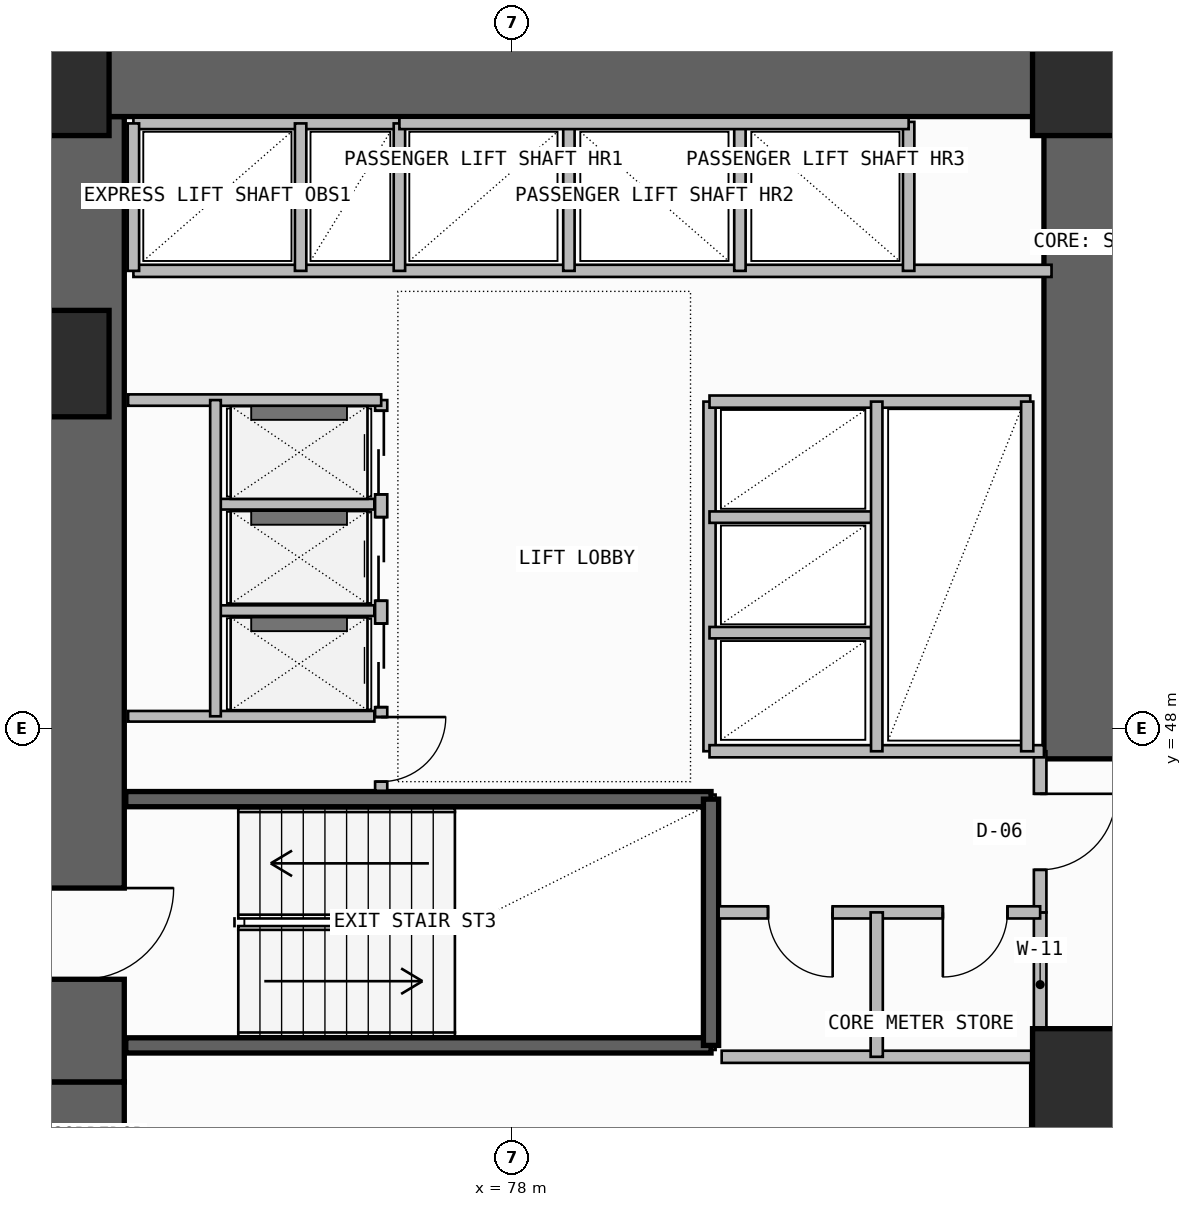
"""IFC4 building model, lengths in metres.
Left out: names, types, materials, properties, quantities, classifications, styles, units other than length and angle.
Written with IfcOpenShell. Run it as: python <this file> out.ifc"""

import sys

from ifc_helpers import new_model, si_unit, direction, frame, frame_2d, origin, origin_2d, place, context, subcontext, project, spatial, rectangle, extrude, element, fill, save


model = new_model("IFC4")
c1 = context("Model", 3, precision=1e-05, world=origin(), true_north=direction((0.0, 1.0)))
c2 = subcontext(c1, "Body", "Model", "MODEL_VIEW")
j1 = project(units=[si_unit("LENGTHUNIT", "METRE"), si_unit("PLANEANGLEUNIT", "RADIAN")], contexts=[c1])
p1 = place(None, origin())
s1 = spatial("IfcSite", under=j1, at=p1, CompositionType="ELEMENT")
p2 = place(p1, origin())
s2 = spatial("IfcBuilding", under=s1, at=p2, CompositionType="ELEMENT")
p3 = place(p2, frame((0.0, 0.0, 88.5)))
s3 = spatial("IfcBuildingStorey", under=s2, at=p3, CompositionType="ELEMENT", Elevation=88.5)
p4 = place(p3, frame((72.35, 35.5, -0.26), z_axis=(0.0, 0.0, 1.0), x_axis=(0.0, 1.0, 0.0)))
e1 = element("IfcWall", 1, at=p4, inside=s3, PredefinedType="SHEAR", context=c2, shape_type="SweptSolid", body=[
    extrude(rectangle(XDim=7.85, YDim=1.1, at=frame_2d((3.925, 0.0))), origin(), (0.0, 0.0, 1.0), 3.6),
])
p5 = place(p4, frame((1.45, 0.0, 0.26)))
e2 = element("IfcOpeningElement", 2, at=p5, cuts=e1, PredefinedType="OPENING", context=c2, shape_type="SweptSolid", body=[
    extrude(rectangle(XDim=1.2, YDim=2.2, at=frame_2d((0.6, 1.1))), frame((0.0, 0.56, 0.0), z_axis=(0.0, -1.0, 0.0), x_axis=(1.0, 0.0, 0.0)), (0.0, 0.0, 1.0), 1.12),
])
p6 = place(p3, frame((72.35, 43.35, -0.26), z_axis=(0.0, 0.0, 1.0), x_axis=(0.0, 1.0, 0.0)))
e3 = element("IfcWall", 3, at=p6, inside=s3, PredefinedType="SHEAR", context=c2, shape_type="SweptSolid", body=[
    extrude(rectangle(XDim=12.7, YDim=1.1, at=frame_2d((6.35, 0.0))), origin(), (0.0, 0.0, 1.0), 3.6),
])
p7 = place(p6, frame((1.35, 0.0, 0.26)))
e4 = element("IfcOpeningElement", 4, at=p7, cuts=e3, PredefinedType="OPENING", context=c2, shape_type="SweptSolid", body=[
    extrude(rectangle(XDim=1.2, YDim=2.2, at=frame_2d((0.6, 1.1))), frame((0.0, 0.56, 0.0), z_axis=(0.0, -1.0, 0.0), x_axis=(1.0, 0.0, 0.0)), (0.0, 0.0, 1.0), 1.12),
])
p8 = place(p3, frame((71.8, 56.6, -0.26), z_axis=(0.0, 0.0, 1.0), x_axis=(1.0, 0.0, 0.0)))
e5 = element("IfcWall", 5, at=p8, inside=s3, PredefinedType="SHEAR", context=c2, shape_type="SweptSolid", body=[
    extrude(rectangle(XDim=14.3, YDim=1.1, at=frame_2d((7.15, 0.0))), origin(), (0.0, 0.0, 1.0), 3.6),
])
p9 = place(p3, frame((85.55, 47.6, -0.26), z_axis=(0.0, 0.0, 1.0), x_axis=(0.0, 1.0, 0.0)))
e6 = element("IfcWall", 6, at=p9, inside=s3, PredefinedType="SHEAR", context=c2, shape_type="SweptSolid", body=[
    extrude(rectangle(XDim=8.45, YDim=1.1, at=frame_2d((4.225, 0.0))), origin(), (0.0, 0.0, 1.0), 3.6),
])
for number, where, z_axis, x_axis in (
    (7, (85.55, 43.35, 0.0), (0.0, 0.0, 1.0), (1.0, 0.0, 0.0)),
    (8, (72.0, 52.8, 0.0), (0.0, 0.0, 1.0), (1.0, 0.0, 0.0)),
    (9, (72.0, 56.5, 0.0), (0.0, 0.0, 1.0), (1.0, 0.0, 0.0)),
    (10, (85.55, 56.5, 0.0), (0.0, 0.0, 1.0), (1.0, 0.0, 0.0)),
):
    element("IfcColumn", number, at=place(p3, frame(where, z_axis=z_axis, x_axis=x_axis)), inside=s3, PredefinedType="COLUMN", context=c2, shape_type="SweptSolid", body=[
        extrude(rectangle(XDim=1.4, YDim=1.4, at=origin_2d()), origin(), (0.0, 0.0, 1.0), 3.6),
    ])
p10 = place(p3, frame((84.92, 38.85, 0.0), z_axis=(0.0, 0.0, 1.0), x_axis=(0.0, 1.0, 0.0)))
e11 = element("IfcWall", 11, at=p10, inside=s3, PredefinedType="SOLIDWALL", context=c2, shape_type="SweptSolid", body=[
    extrude(rectangle(XDim=4.83, YDim=0.2, at=frame_2d((2.415, 0.0))), origin(), (0.0, 0.0, 1.0), 3.34),
])
p11 = place(p10, frame((1.25, 0.0, 0.0)))
e12 = element("IfcOpeningElement", 12, at=p11, cuts=e11, PredefinedType="OPENING", context=c2, shape_type="SweptSolid", body=[
    extrude(rectangle(XDim=1.1, YDim=2.2, at=frame_2d((0.55, 1.1))), frame((0.0, 0.11, 0.0), z_axis=(0.0, -1.0, 0.0), x_axis=(1.0, 0.0, 0.0)), (0.0, 0.0, 1.0), 0.22),
])
for number, where, z_axis, x_axis in (
    (13, (72.92, 43.83, -0.26), (0.0, 0.0, 1.0), (1.0, 0.0, 0.0)),
    (14, (72.92, 47.07, -0.26), (0.0, 0.0, 1.0), (1.0, 0.0, 0.0)),
):
    element("IfcWall", number, at=place(p3, frame(where, z_axis=z_axis, x_axis=x_axis)), inside=s3, PredefinedType="SOLIDWALL", context=c2, shape_type="SweptSolid", body=[
        extrude(rectangle(XDim=7.7, YDim=0.2, at=frame_2d((3.85, 0.0))), origin(), (0.0, 0.0, 1.0), 3.6),
    ])
p12 = place(p3, frame((80.62, 43.83, -0.26), z_axis=(0.0, 0.0, 1.0), x_axis=(0.0, 1.0, 0.0)))
e15 = element("IfcWall", 15, at=p12, inside=s3, PredefinedType="SOLIDWALL", context=c2, shape_type="SweptSolid", body=[
    extrude(rectangle(XDim=3.24, YDim=0.2, at=frame_2d((1.62, 0.0))), origin(), (0.0, 0.0, 1.0), 3.6),
])
p13 = place(p3, frame((84.95, 43.68, 0.0), z_axis=(0.0, 0.0, 1.0), x_axis=(0.0, 1.0, 0.0)))
e16 = element("IfcWall", 16, at=p13, inside=s3, PredefinedType="PLUMBINGWALL", context=c2, shape_type="SweptSolid", body=[
    extrude(rectangle(XDim=1.9, YDim=0.165, at=frame_2d((0.95, 0.0))), origin(), (0.0, 0.0, 1.0), 3.34),
])
p14 = place(p3, frame((84.95, 45.58, 0.0), z_axis=(0.0, 0.0, 1.0), x_axis=(0.0, 1.0, 0.0)))
e17 = element("IfcWall", 17, at=p14, inside=s3, PredefinedType="PARTITIONING", context=c2, shape_type="SweptSolid", body=[
    extrude(rectangle(XDim=2.12, YDim=0.165, at=frame_2d((1.06, 0.0))), origin(), (0.0, 0.0, 1.0), 3.34),
])
p15 = place(p14, frame((0.56, 0.0, 0.0)))
e18 = element("IfcOpeningElement", 18, at=p15, cuts=e17, PredefinedType="OPENING", context=c2, shape_type="SweptSolid", body=[
    extrude(rectangle(XDim=1.0, YDim=2.2, at=frame_2d((0.5, 1.1))), frame((0.0, 0.093, 0.0), z_axis=(0.0, -1.0, 0.0), x_axis=(1.0, 0.0, 0.0)), (0.0, 0.0, 1.0), 0.185),
])
p16 = place(p3, frame((80.72, 45.58, 0.0), z_axis=(0.0, 0.0, 1.0), x_axis=(1.0, 0.0, 0.0)))
e19 = element("IfcWall", 19, at=p16, inside=s3, PredefinedType="PLUMBINGWALL", context=c2, shape_type="SweptSolid", body=[
    extrude(rectangle(XDim=4.23, YDim=0.16, at=frame_2d((2.115, 0.0))), origin(), (0.0, 0.0, 1.0), 3.34),
])
p17 = place(p16, frame((0.65, 0.0, 0.0)))
e20 = element("IfcOpeningElement", 20, at=p17, cuts=e19, PredefinedType="OPENING", context=c2, shape_type="SweptSolid", body=[
    extrude(rectangle(XDim=0.85, YDim=2.05, at=frame_2d((0.425, 1.025))), frame((0.0, 0.09, 0.0), z_axis=(0.0, -1.0, 0.0), x_axis=(1.0, 0.0, 0.0)), (0.0, 0.0, 1.0), 0.18),
])
p18 = place(p16, frame((2.95, 0.0, 0.0)))
e21 = element("IfcOpeningElement", 21, at=p18, cuts=e19, PredefinedType="OPENING", context=c2, shape_type="SweptSolid", body=[
    extrude(rectangle(XDim=0.85, YDim=2.05, at=frame_2d((0.425, 1.025))), frame((0.0, 0.09, 0.0), z_axis=(0.0, -1.0, 0.0), x_axis=(1.0, 0.0, 0.0)), (0.0, 0.0, 1.0), 0.18),
])
p19 = place(p3, frame((80.76, 43.68, 0.0), z_axis=(0.0, 0.0, 1.0), x_axis=(1.0, 0.0, 0.0)))
e22 = element("IfcWall", 22, at=p19, inside=s3, PredefinedType="PLUMBINGWALL", context=c2, shape_type="SweptSolid", body=[
    extrude(rectangle(XDim=4.19, YDim=0.16, at=frame_2d((2.095, 0.0))), origin(), (0.0, 0.0, 1.0), 3.34),
])
p20 = place(p3, frame((82.8, 43.68, 0.0), z_axis=(0.0, 0.0, 1.0), x_axis=(0.0, 1.0, 0.0)))
e23 = element("IfcWall", 23, at=p20, inside=s3, PredefinedType="PLUMBINGWALL", context=c2, shape_type="SweptSolid", body=[
    extrude(rectangle(XDim=1.9, YDim=0.16, at=frame_2d((0.95, 0.0))), origin(), (0.0, 0.0, 1.0), 3.34),
])
p21 = place(p3, frame((76.28, 47.18, 0.0), z_axis=(0.0, 0.0, 1.0), x_axis=(0.0, 1.0, 0.0)))
e24 = element("IfcWall", 24, at=p21, inside=s3, PredefinedType="SOLIDWALL", context=c2, shape_type="SweptSolid", body=[
    extrude(rectangle(XDim=5.14, YDim=0.16, at=frame_2d((2.57, 0.0))), origin(), (0.0, 0.0, 1.0), 3.34),
])
p22 = place(p21, frame((1.1, 0.0, 0.0)))
e25 = element("IfcOpeningElement", 25, at=p22, cuts=e24, PredefinedType="OPENING", context=c2, shape_type="SweptSolid", body=[
    extrude(rectangle(XDim=1.1, YDim=2.25, at=frame_2d((0.55, 1.125))), frame((0.0, 0.09, 0.0), z_axis=(0.0, -1.0, 0.0), x_axis=(1.0, 0.0, 0.0)), (0.0, 0.0, 1.0), 0.18),
])
p23 = place(p21, frame((2.5, 0.0, 0.0)))
e26 = element("IfcOpeningElement", 26, at=p23, cuts=e24, PredefinedType="OPENING", context=c2, shape_type="SweptSolid", body=[
    extrude(rectangle(XDim=1.1, YDim=2.25, at=frame_2d((0.55, 1.125))), frame((0.0, 0.09, 0.0), z_axis=(0.0, -1.0, 0.0), x_axis=(1.0, 0.0, 0.0)), (0.0, 0.0, 1.0), 0.18),
])
p24 = place(p21, frame((3.9, 0.0, 0.0)))
e27 = element("IfcOpeningElement", 27, at=p24, cuts=e24, PredefinedType="OPENING", context=c2, shape_type="SweptSolid", body=[
    extrude(rectangle(XDim=1.1, YDim=2.25, at=frame_2d((0.55, 1.125))), frame((0.0, 0.09, 0.0), z_axis=(0.0, -1.0, 0.0), x_axis=(1.0, 0.0, 0.0)), (0.0, 0.0, 1.0), 0.18),
])
p25 = place(p21, frame((0.12, 0.0, 0.0)))
e28 = element("IfcOpeningElement", 28, at=p25, cuts=e24, PredefinedType="OPENING", context=c2, shape_type="SweptSolid", body=[
    extrude(rectangle(XDim=0.85, YDim=2.05, at=frame_2d((0.425, 1.025))), frame((0.0, 0.09, 0.0), z_axis=(0.0, -1.0, 0.0), x_axis=(1.0, 0.0, 0.0)), (0.0, 0.0, 1.0), 0.18),
])
p26 = place(p3, frame((72.95, 52.32, 0.0), z_axis=(0.0, 0.0, 1.0), x_axis=(1.0, 0.0, 0.0)))
e29 = element("IfcWall", 29, at=p26, inside=s3, PredefinedType="SOLIDWALL", context=c2, shape_type="SweptSolid", body=[
    extrude(rectangle(XDim=3.33, YDim=0.15, at=frame_2d((1.665, 0.0))), origin(), (0.0, 0.0, 1.0), 3.34),
])
p27 = place(p3, frame((72.95, 48.16, 0.0), z_axis=(0.0, 0.0, 1.0), x_axis=(1.0, 0.0, 0.0)))
e30 = element("IfcWall", 30, at=p27, inside=s3, PredefinedType="PLUMBINGWALL", context=c2, shape_type="SweptSolid", body=[
    extrude(rectangle(XDim=3.24, YDim=0.14, at=frame_2d((1.62, 0.0))), origin(), (0.0, 0.0, 1.0), 3.34),
])
for number, where, z_axis, x_axis in (
    (31, (74.15, 49.55, 0.0), (0.0, 0.0, 1.0), (1.0, 0.0, 0.0)),
    (32, (74.15, 50.95, 0.0), (0.0, 0.0, 1.0), (1.0, 0.0, 0.0)),
):
    element("IfcWall", number, at=place(p3, frame(where, z_axis=z_axis, x_axis=x_axis)), inside=s3, PredefinedType="PLUMBINGWALL", context=c2, shape_type="SweptSolid", body=[
        extrude(rectangle(XDim=2.04, YDim=0.14, at=frame_2d((1.02, 0.0))), origin(), (0.0, 0.0, 1.0), 3.34),
    ])
p28 = place(p3, frame((74.1, 48.16, 0.0), z_axis=(0.0, 0.0, 1.0), x_axis=(0.0, 1.0, 0.0)))
e33 = element("IfcWall", 33, at=p28, inside=s3, PredefinedType="PLUMBINGWALL", context=c2, shape_type="SweptSolid", body=[
    extrude(rectangle(XDim=4.16, YDim=0.14, at=frame_2d((2.08, 0.0))), origin(), (0.0, 0.0, 1.0), 3.34),
])
p29 = place(p3, frame((80.6, 47.7, 0.0), z_axis=(0.0, 0.0, 1.0), x_axis=(0.0, 1.0, 0.0)))
e34 = element("IfcWall", 34, at=p29, inside=s3, PredefinedType="SOLIDWALL", context=c2, shape_type="SweptSolid", body=[
    extrude(rectangle(XDim=4.6, YDim=0.16, at=frame_2d((2.3, 0.0))), origin(), (0.0, 0.0, 1.0), 3.34),
])
p30 = place(p3, frame((80.6, 47.7, 0.0), z_axis=(0.0, 0.0, 1.0), x_axis=(1.0, 0.0, 0.0)))
e35 = element("IfcWall", 35, at=p30, inside=s3, PredefinedType="SOLIDWALL", context=c2, shape_type="SweptSolid", body=[
    extrude(rectangle(XDim=4.4, YDim=0.16, at=frame_2d((2.2, 0.0))), origin(), (0.0, 0.0, 1.0), 3.34),
])
p31 = place(p3, frame((80.6, 52.3, 0.0), z_axis=(0.0, 0.0, 1.0), x_axis=(1.0, 0.0, 0.0)))
e36 = element("IfcWall", 36, at=p31, inside=s3, PredefinedType="SOLIDWALL", context=c2, shape_type="SweptSolid", body=[
    extrude(rectangle(XDim=4.22, YDim=0.16, at=frame_2d((2.11, 0.0))), origin(), (0.0, 0.0, 1.0), 3.34),
])
for number, where, z_axis, x_axis in (
    (37, (80.6, 49.26, 0.0), (0.0, 0.0, 1.0), (1.0, 0.0, 0.0)),
    (38, (80.6, 50.78, 0.0), (0.0, 0.0, 1.0), (1.0, 0.0, 0.0)),
):
    element("IfcWall", number, at=place(p3, frame(where, z_axis=z_axis, x_axis=x_axis)), inside=s3, PredefinedType="PLUMBINGWALL", context=c2, shape_type="SweptSolid", body=[
        extrude(rectangle(XDim=2.2, YDim=0.15, at=frame_2d((1.1, 0.0))), origin(), (0.0, 0.0, 1.0), 3.34),
    ])
p32 = place(p3, frame((82.8, 47.7, 0.0), z_axis=(0.0, 0.0, 1.0), x_axis=(0.0, 1.0, 0.0)))
e39 = element("IfcWall", 39, at=p32, inside=s3, PredefinedType="PLUMBINGWALL", context=c2, shape_type="SweptSolid", body=[
    extrude(rectangle(XDim=4.6, YDim=0.15, at=frame_2d((2.3, 0.0))), origin(), (0.0, 0.0, 1.0), 3.34),
])
p33 = place(p3, frame((84.78, 47.7, 0.0), z_axis=(0.0, 0.0, 1.0), x_axis=(0.0, 1.0, 0.0)))
e40 = element("IfcWall", 40, at=p33, inside=s3, PredefinedType="SOLIDWALL", context=c2, shape_type="SweptSolid", body=[
    extrude(rectangle(XDim=4.6, YDim=0.16, at=frame_2d((2.3, 0.0))), origin(), (0.0, 0.0, 1.0), 3.34),
])
p34 = place(p3, frame((73.02, 54.02, 0.0), z_axis=(0.0, 0.0, 1.0), x_axis=(1.0, 0.0, 0.0)))
e41 = element("IfcWall", 41, at=p34, inside=s3, PredefinedType="SOLIDWALL", context=c2, shape_type="SweptSolid", body=[
    extrude(rectangle(XDim=12.08, YDim=0.16, at=frame_2d((6.04, 0.0))), origin(), (0.0, 0.0, 1.0), 3.34),
])
p35 = place(p3, frame((73.02, 55.96, 0.0), z_axis=(0.0, 0.0, 1.0), x_axis=(1.0, 0.0, 0.0)))
e42 = element("IfcWall", 42, at=p35, inside=s3, PredefinedType="SOLIDWALL", context=c2, shape_type="SweptSolid", body=[
    extrude(rectangle(XDim=3.5, YDim=0.15, at=frame_2d((1.75, 0.0))), origin(), (0.0, 0.0, 1.0), 3.34),
])
p36 = place(p3, frame((73.02, 54.02, 0.0), z_axis=(0.0, 0.0, 1.0), x_axis=(0.0, 1.0, 0.0)))
e43 = element("IfcWall", 43, at=p36, inside=s3, PredefinedType="PLUMBINGWALL", context=c2, shape_type="SweptSolid", body=[
    extrude(rectangle(XDim=1.94, YDim=0.15, at=frame_2d((0.97, 0.0))), origin(), (0.0, 0.0, 1.0), 3.34),
])
p37 = place(p3, frame((76.52, 54.02, 0.0), z_axis=(0.0, 0.0, 1.0), x_axis=(0.0, 1.0, 0.0)))
e44 = element("IfcWall", 44, at=p37, inside=s3, PredefinedType="SOLIDWALL", context=c2, shape_type="SweptSolid", body=[
    extrude(rectangle(XDim=1.94, YDim=0.15, at=frame_2d((0.97, 0.0))), origin(), (0.0, 0.0, 1.0), 3.34),
])
p38 = place(p3, frame((75.22, 54.02, 0.0), z_axis=(0.0, 0.0, 1.0), x_axis=(0.0, 1.0, 0.0)))
e45 = element("IfcWall", 45, at=p38, inside=s3, PredefinedType="PLUMBINGWALL", context=c2, shape_type="SweptSolid", body=[
    extrude(rectangle(XDim=1.94, YDim=0.15, at=frame_2d((0.97, 0.0))), origin(), (0.0, 0.0, 1.0), 3.34),
])
for number, where, z_axis, x_axis in (
    (46, (78.75, 54.02, 0.0), (0.0, 0.0, 1.0), (0.0, 1.0, 0.0)),
    (47, (81.0, 54.02, 0.0), (0.0, 0.0, 1.0), (0.0, 1.0, 0.0)),
):
    element("IfcWall", number, at=place(p3, frame(where, z_axis=z_axis, x_axis=x_axis)), inside=s3, PredefinedType="PLUMBINGWALL", context=c2, shape_type="SweptSolid", body=[
        extrude(rectangle(XDim=1.96, YDim=0.15, at=frame_2d((0.98, 0.0))), origin(), (0.0, 0.0, 1.0), 3.34),
    ])
p39 = place(p3, frame((83.22, 54.02, 0.0), z_axis=(0.0, 0.0, 1.0), x_axis=(0.0, 1.0, 0.0)))
e48 = element("IfcWall", 48, at=p39, inside=s3, PredefinedType="SOLIDWALL", context=c2, shape_type="SweptSolid", body=[
    extrude(rectangle(XDim=1.96, YDim=0.15, at=frame_2d((0.98, 0.0))), origin(), (0.0, 0.0, 1.0), 3.34),
])
p40 = place(p3, frame((76.52, 55.96, 0.0), z_axis=(0.0, 0.0, 1.0), x_axis=(1.0, 0.0, 0.0)))
e49 = element("IfcWall", 49, at=p40, inside=s3, PredefinedType="SOLIDWALL", context=c2, shape_type="SweptSolid", body=[
    extrude(rectangle(XDim=6.7, YDim=0.15, at=frame_2d((3.35, 0.0))), origin(), (0.0, 0.0, 1.0), 3.34),
])
p41 = place(p7, frame((1.2, 0.0, 0.0), z_axis=(0.0, 0.0, 1.0), x_axis=(-1.0, 0.0, 0.0)))
e50 = element("IfcDoor", 50, at=p41, inside=s3, OperationType="SINGLE_SWING_LEFT", PredefinedType="USERDEFINED", context=c2, shape_type="SweptSolid", body=[
    extrude(rectangle(XDim=1.2, YDim=2.2, at=frame_2d((0.6, 1.1))), frame((0.0, 0.025, 0.0), z_axis=(0.0, -1.0, 0.0), x_axis=(1.0, 0.0, 0.0)), (0.0, 0.0, 1.0), 0.05),
])
fill(e4, e50)
p42 = place(p15, frame((1.0, 0.0, 0.0), z_axis=(0.0, 0.0, 1.0), x_axis=(-1.0, 0.0, 0.0)))
e51 = element("IfcDoor", 51, at=p42, inside=s3, OperationType="SINGLE_SWING_LEFT", PredefinedType="DOOR", context=c2, shape_type="SweptSolid", body=[
    extrude(rectangle(XDim=1.0, YDim=2.2, at=frame_2d((0.5, 1.1))), frame((0.0, 0.025, 0.0), z_axis=(0.0, -1.0, 0.0), x_axis=(1.0, 0.0, 0.0)), (0.0, 0.0, 1.0), 0.05),
])
fill(e18, e51)
p43 = place(p17, frame((0.85, 0.0, 0.0), z_axis=(0.0, 0.0, 1.0), x_axis=(-1.0, 0.0, 0.0)))
e52 = element("IfcDoor", 52, at=p43, inside=s3, OperationType="SINGLE_SWING_LEFT", PredefinedType="DOOR", context=c2, shape_type="SweptSolid", body=[
    extrude(rectangle(XDim=0.85, YDim=2.05, at=frame_2d((0.425, 1.025))), frame((0.0, 0.025, 0.0), z_axis=(0.0, -1.0, 0.0), x_axis=(1.0, 0.0, 0.0)), (0.0, 0.0, 1.0), 0.05),
])
fill(e20, e52)
p44 = place(p18, frame((0.85, 0.0, 0.0), z_axis=(0.0, 0.0, 1.0), x_axis=(-1.0, 0.0, 0.0)))
e53 = element("IfcDoor", 53, at=p44, inside=s3, OperationType="SINGLE_SWING_RIGHT", PredefinedType="DOOR", context=c2, shape_type="SweptSolid", body=[
    extrude(rectangle(XDim=0.85, YDim=2.05, at=frame_2d((0.425, 1.025))), frame((0.0, 0.025, 0.0), z_axis=(0.0, -1.0, 0.0), x_axis=(1.0, 0.0, 0.0)), (0.0, 0.0, 1.0), 0.05),
])
fill(e21, e53)
p45 = place(p22, origin())
e54 = element("IfcDoor", 54, at=p45, inside=s3, OperationType="DOUBLE_DOOR_SLIDING", PredefinedType="DOOR", context=c2, shape_type="SweptSolid", body=[
    extrude(rectangle(XDim=1.1, YDim=2.25, at=frame_2d((0.55, 1.125))), frame((0.0, 0.025, 0.0), z_axis=(0.0, -1.0, 0.0), x_axis=(1.0, 0.0, 0.0)), (0.0, 0.0, 1.0), 0.05),
])
fill(e25, e54)
p46 = place(p23, origin())
e55 = element("IfcDoor", 55, at=p46, inside=s3, OperationType="DOUBLE_DOOR_SLIDING", PredefinedType="DOOR", context=c2, shape_type="SweptSolid", body=[
    extrude(rectangle(XDim=1.1, YDim=2.25, at=frame_2d((0.55, 1.125))), frame((0.0, 0.025, 0.0), z_axis=(0.0, -1.0, 0.0), x_axis=(1.0, 0.0, 0.0)), (0.0, 0.0, 1.0), 0.05),
])
fill(e26, e55)
p47 = place(p24, origin())
e56 = element("IfcDoor", 56, at=p47, inside=s3, OperationType="DOUBLE_DOOR_SLIDING", PredefinedType="DOOR", context=c2, shape_type="SweptSolid", body=[
    extrude(rectangle(XDim=1.1, YDim=2.25, at=frame_2d((0.55, 1.125))), frame((0.0, 0.025, 0.0), z_axis=(0.0, -1.0, 0.0), x_axis=(1.0, 0.0, 0.0)), (0.0, 0.0, 1.0), 0.05),
])
fill(e27, e56)
p48 = place(p25, frame((0.85, 0.0, 0.0), z_axis=(0.0, 0.0, 1.0), x_axis=(-1.0, 0.0, 0.0)))
e57 = element("IfcDoor", 57, at=p48, inside=s3, OperationType="SINGLE_SWING_LEFT", PredefinedType="DOOR", context=c2, shape_type="SweptSolid", body=[
    extrude(rectangle(XDim=0.85, YDim=2.05, at=frame_2d((0.425, 1.025))), frame((0.0, 0.025, 0.0), z_axis=(0.0, -1.0, 0.0), x_axis=(1.0, 0.0, 0.0)), (0.0, 0.0, 1.0), 0.05),
])
fill(e28, e57)
save(model, sys.argv[1])
